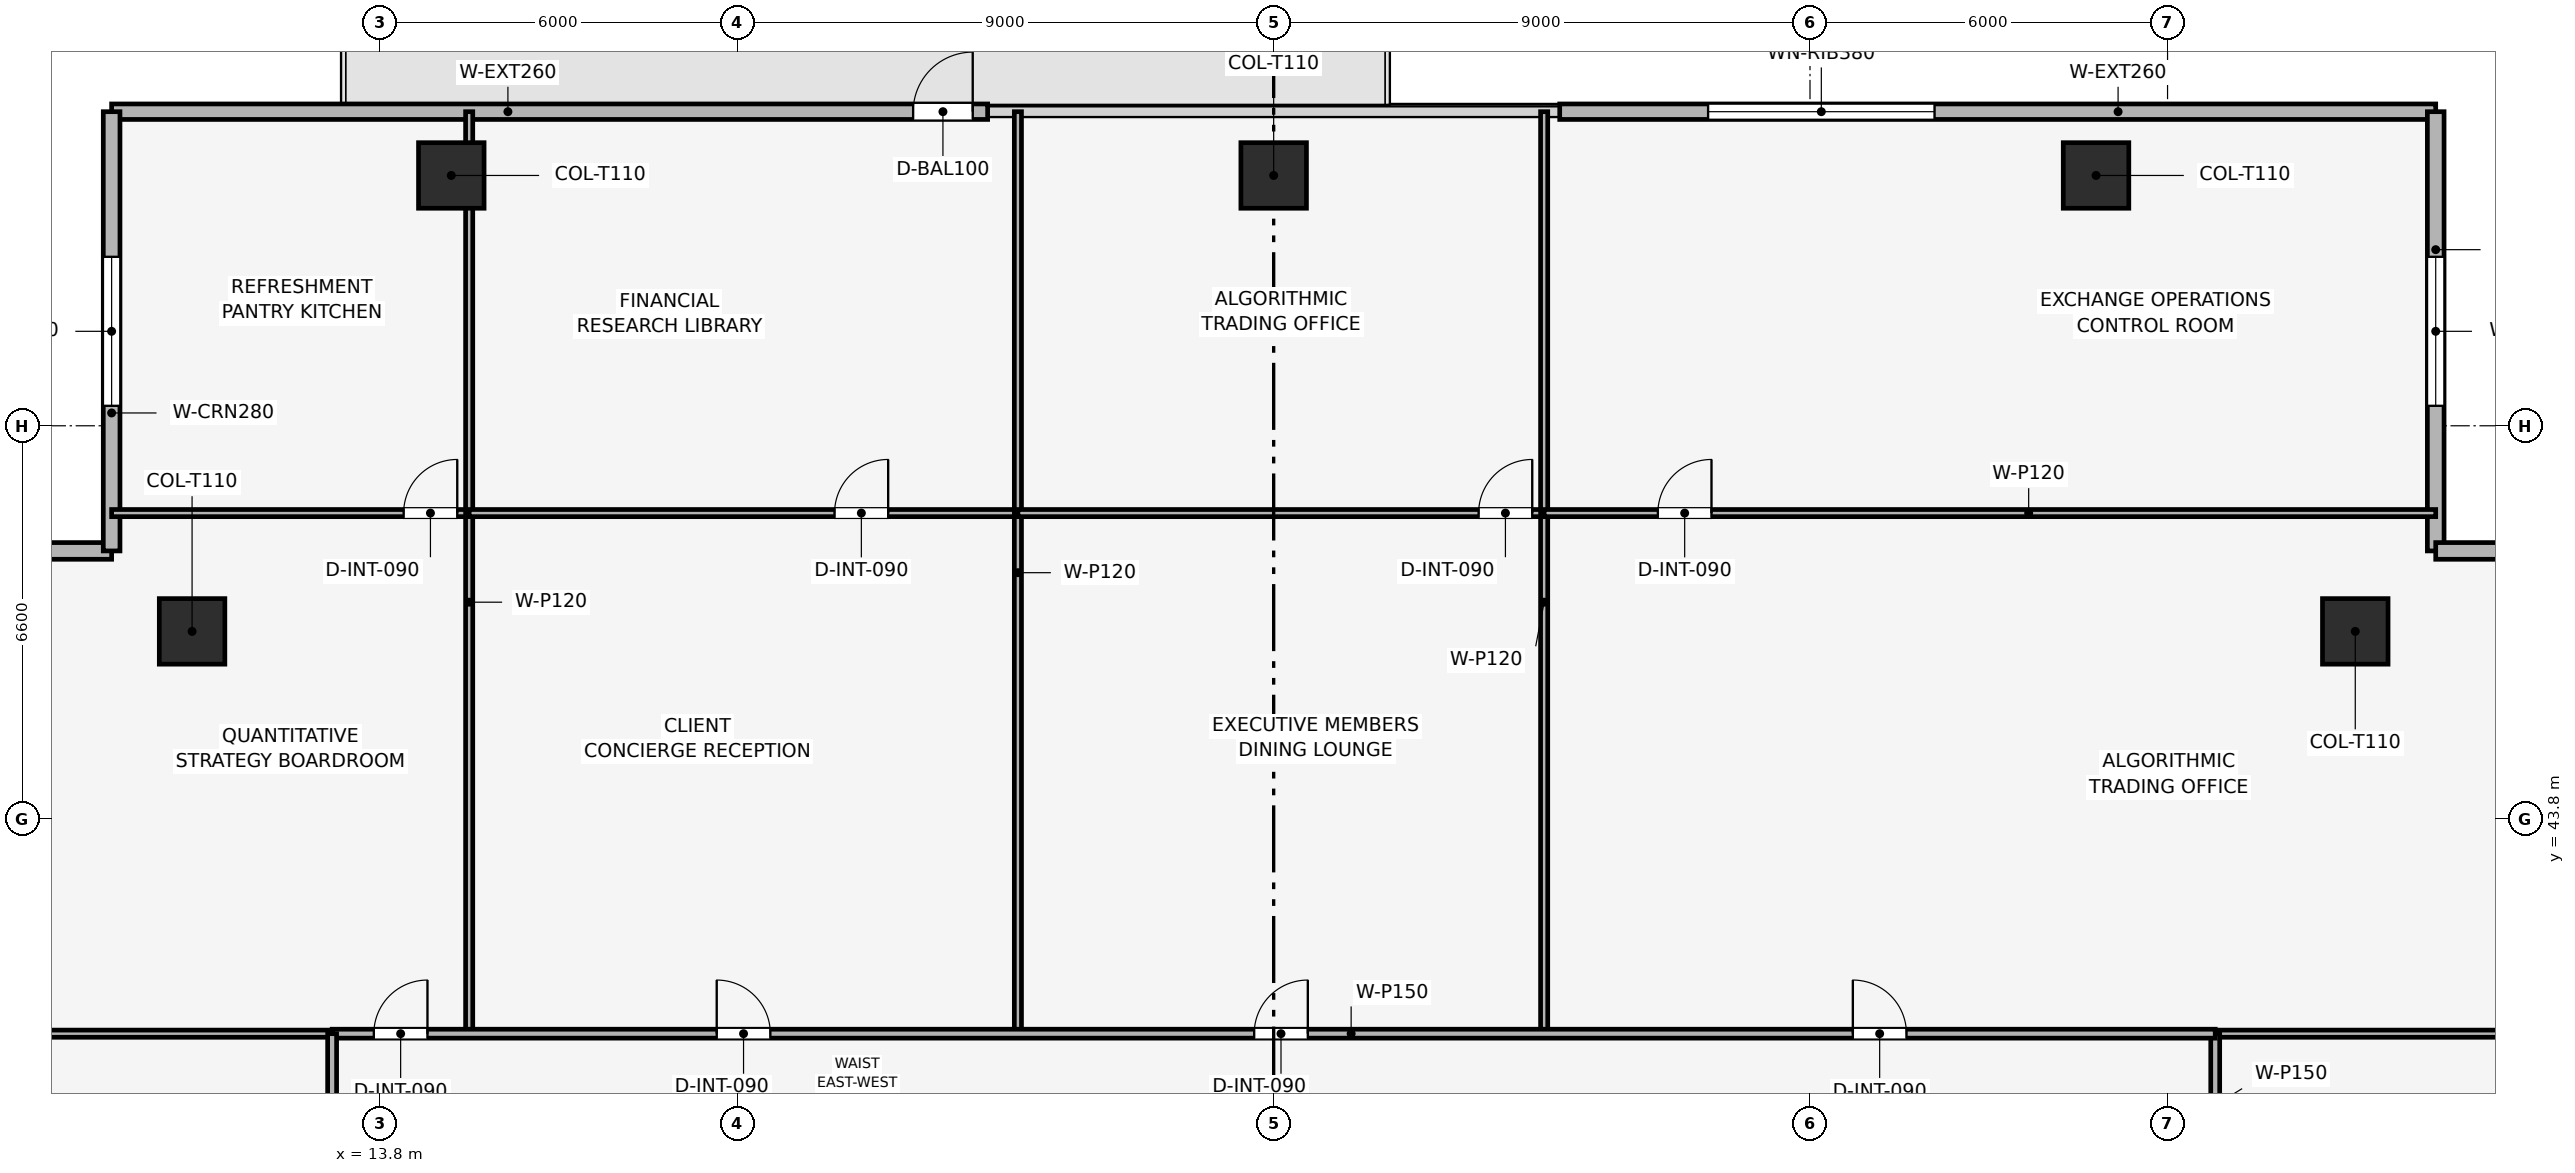
"""IFC4 building model, lengths in metres.
Left out: names, types, materials, properties, quantities, classifications, styles, units other than length and angle.
Written with IfcOpenShell. Run it as: python <this file> out.ifc"""

import sys

from ifc_helpers import new_model, si_unit, direction, frame, frame_2d, origin, origin_2d, place, context, subcontext, project, spatial, rectangle, extrude, element, fill, save


model = new_model("IFC4")
c1 = context("Model", 3, precision=1e-05, world=origin(), true_north=direction((0.0, 1.0)))
c2 = subcontext(c1, "Body", "Model", "MODEL_VIEW")
j1 = project(units=[si_unit("LENGTHUNIT", "METRE"), si_unit("PLANEANGLEUNIT", "RADIAN")], contexts=[c1])
p1 = place(None, origin())
s1 = spatial("IfcSite", under=j1, at=p1, CompositionType="ELEMENT")
p2 = place(p1, origin())
s2 = spatial("IfcBuilding", under=s1, at=p2, CompositionType="ELEMENT")
p3 = place(p2, frame((0.0, 0.0, 203.7)))
s3 = spatial("IfcBuildingStorey", under=s2, at=p3, CompositionType="ELEMENT", Elevation=203.7)
for number, where, z_axis, x_axis in (
    (1, (42.6, 54.6, 0.003), (0.0, 0.0, 1.0), (1.0, 0.0, 0.0)),
    (2, (28.8, 54.6, 0.003), (0.0, 0.0, 1.0), (1.0, 0.0, 0.0)),
    (3, (15.0, 54.6, 0.003), (0.0, 0.0, 1.0), (1.0, 0.0, 0.0)),
    (4, (46.95, 46.95, 0.003), (0.0, 0.0, 1.0), (1.0, 0.0, 0.0)),
    (5, (10.65, 46.95, 0.003), (0.0, 0.0, 1.0), (1.0, 0.0, 0.0)),
):
    element("IfcColumn", number, at=place(p3, frame(where, z_axis=z_axis, x_axis=x_axis)), inside=s3, PredefinedType="COLUMN", context=c2, shape_type="SweptSolid", body=[
        extrude(rectangle(XDim=1.1, YDim=1.1, at=origin_2d()), origin(), (0.0, 0.0, 1.0), 3.494),
    ])
p4 = place(p3, frame((9.3, 55.67, 0.0), z_axis=(0.0, 0.0, 1.0), x_axis=(1.0, 0.0, 0.0)))
e6 = element("IfcWall", 6, at=p4, inside=s3, PredefinedType="SOLIDWALL", context=c2, shape_type="SweptSolid", body=[
    extrude(rectangle(XDim=14.7, YDim=0.26, at=frame_2d((7.35, 0.0))), origin(), (0.0, 0.0, 1.0), 3.5),
])
p5 = place(p4, frame((13.45, 0.0, 0.0)))
e7 = element("IfcOpeningElement", 7, at=p5, cuts=e6, PredefinedType="OPENING", context=c2, shape_type="SweptSolid", body=[
    extrude(rectangle(XDim=1.0, YDim=2.2, at=frame_2d((0.5, 1.1))), frame((0.0, 0.14, 0.0), z_axis=(0.0, -1.0, 0.0), x_axis=(1.0, 0.0, 0.0)), (0.0, 0.0, 1.0), 0.28),
])
p6 = place(p3, frame((33.6, 55.67, 0.0), z_axis=(0.0, 0.0, 1.0), x_axis=(1.0, 0.0, 0.0)))
e8 = element("IfcWall", 8, at=p6, inside=s3, PredefinedType="SOLIDWALL", context=c2, shape_type="SweptSolid", body=[
    extrude(rectangle(XDim=14.7, YDim=0.26, at=frame_2d((7.35, 0.0))), origin(), (0.0, 0.0, 1.0), 3.5),
])
p7 = place(p6, frame((2.49, 0.0, 0.9)))
e9 = element("IfcOpeningElement", 9, at=p7, cuts=e8, PredefinedType="OPENING", context=c2, shape_type="SweptSolid", body=[
    extrude(rectangle(XDim=3.8, YDim=1.9, at=frame_2d((1.9, 0.95))), frame((0.0, 0.14, 0.0), z_axis=(0.0, -1.0, 0.0), x_axis=(1.0, 0.0, 0.0)), (0.0, 0.0, 1.0), 0.28),
])
p8 = place(p3, frame((1.93, 48.3, 0.0), z_axis=(0.0, 0.0, 1.0), x_axis=(1.0, 0.0, 0.0)))
e10 = element("IfcWall", 10, at=p8, inside=s3, PredefinedType="SOLIDWALL", context=c2, shape_type="SweptSolid", body=[
    extrude(rectangle(XDim=7.37, YDim=0.28, at=frame_2d((3.685, 0.0))), origin(), (0.0, 0.0, 1.0), 3.5),
])
p9 = place(p8, frame((2.435, 0.0, 0.9)))
e11 = element("IfcOpeningElement", 11, at=p9, cuts=e10, PredefinedType="OPENING", context=c2, shape_type="SweptSolid", body=[
    extrude(rectangle(XDim=2.5, YDim=1.9, at=frame_2d((1.25, 0.95))), frame((0.0, 0.15, 0.0), z_axis=(0.0, -1.0, 0.0), x_axis=(1.0, 0.0, 0.0)), (0.0, 0.0, 1.0), 0.3),
])
p10 = place(p3, frame((9.3, 48.3, 0.0), z_axis=(0.0, 0.0, 1.0), x_axis=(0.0, 1.0, 0.0)))
e12 = element("IfcWall", 12, at=p10, inside=s3, PredefinedType="SOLIDWALL", context=c2, shape_type="SweptSolid", body=[
    extrude(rectangle(XDim=7.37, YDim=0.28, at=frame_2d((3.685, 0.0))), origin(), (0.0, 0.0, 1.0), 3.5),
])
p11 = place(p10, frame((2.435, 0.0, 0.9)))
e13 = element("IfcOpeningElement", 13, at=p11, cuts=e12, PredefinedType="OPENING", context=c2, shape_type="SweptSolid", body=[
    extrude(rectangle(XDim=2.5, YDim=1.9, at=frame_2d((1.25, 0.95))), frame((0.0, 0.15, 0.0), z_axis=(0.0, -1.0, 0.0), x_axis=(1.0, 0.0, 0.0)), (0.0, 0.0, 1.0), 0.3),
])
p12 = place(p3, frame((48.3, 55.67, 0.0), z_axis=(0.0, 0.0, 1.0), x_axis=(0.0, -1.0, 0.0)))
e14 = element("IfcWall", 14, at=p12, inside=s3, PredefinedType="SOLIDWALL", context=c2, shape_type="SweptSolid", body=[
    extrude(rectangle(XDim=7.37, YDim=0.28, at=frame_2d((3.685, 0.0))), origin(), (0.0, 0.0, 1.0), 3.5),
])
p13 = place(p12, frame((2.435, 0.0, 0.9)))
e15 = element("IfcOpeningElement", 15, at=p13, cuts=e14, PredefinedType="OPENING", context=c2, shape_type="SweptSolid", body=[
    extrude(rectangle(XDim=2.5, YDim=1.9, at=frame_2d((1.25, 0.95))), frame((0.0, 0.15, 0.0), z_axis=(0.0, -1.0, 0.0), x_axis=(1.0, 0.0, 0.0)), (0.0, 0.0, 1.0), 0.3),
])
p14 = place(p3, frame((48.3, 48.3, 0.0), z_axis=(0.0, 0.0, 1.0), x_axis=(1.0, 0.0, 0.0)))
e16 = element("IfcWall", 16, at=p14, inside=s3, PredefinedType="SOLIDWALL", context=c2, shape_type="SweptSolid", body=[
    extrude(rectangle(XDim=7.37, YDim=0.28, at=frame_2d((3.685, 0.0))), origin(), (0.0, 0.0, 1.0), 3.5),
])
p15 = place(p14, frame((2.435, 0.0, 0.9)))
e17 = element("IfcOpeningElement", 17, at=p15, cuts=e16, PredefinedType="OPENING", context=c2, shape_type="SweptSolid", body=[
    extrude(rectangle(XDim=2.5, YDim=1.9, at=frame_2d((1.25, 0.95))), frame((0.0, 0.15, 0.0), z_axis=(0.0, -1.0, 0.0), x_axis=(1.0, 0.0, 0.0)), (0.0, 0.0, 1.0), 0.3),
])
p16 = place(p3, frame((9.3, 48.935, 0.0), z_axis=(0.0, 0.0, 1.0), x_axis=(1.0, 0.0, 0.0)))
e18 = element("IfcWall", 18, at=p16, inside=s3, PredefinedType="PARTITIONING", context=c2, shape_type="SweptSolid", body=[
    extrude(rectangle(XDim=6.0, YDim=0.12, at=frame_2d((3.0, 0.0))), origin(), (0.0, 0.0, 1.0), 2.885),
])
p17 = place(p16, frame((4.9, 0.0, 0.0)))
e19 = element("IfcOpeningElement", 19, at=p17, cuts=e18, PredefinedType="OPENING", context=c2, shape_type="SweptSolid", body=[
    extrude(rectangle(XDim=0.9, YDim=2.1, at=frame_2d((0.45, 1.05))), frame((0.0, 0.07, 0.0), z_axis=(0.0, -1.0, 0.0), x_axis=(1.0, 0.0, 0.0)), (0.0, 0.0, 1.0), 0.14),
])
p18 = place(p3, frame((15.3, 40.2, 0.0), z_axis=(0.0, 0.0, 1.0), x_axis=(0.0, 1.0, 0.0)))
e20 = element("IfcWall", 20, at=p18, inside=s3, PredefinedType="PARTITIONING", context=c2, shape_type="SweptSolid", body=[
    extrude(rectangle(XDim=15.47, YDim=0.12, at=frame_2d((7.735, 0.0))), origin(), (0.0, 0.0, 1.0), 2.885),
])
p19 = place(p3, frame((15.3, 48.935, 0.0), z_axis=(0.0, 0.0, 1.0), x_axis=(1.0, 0.0, 0.0)))
e21 = element("IfcWall", 21, at=p19, inside=s3, PredefinedType="PARTITIONING", context=c2, shape_type="SweptSolid", body=[
    extrude(rectangle(XDim=9.208, YDim=0.12, at=frame_2d((4.604, 0.0))), origin(), (0.0, 0.0, 1.0), 3.035),
])
p20 = place(p19, frame((6.131, 0.0, 0.0)))
e22 = element("IfcOpeningElement", 22, at=p20, cuts=e21, PredefinedType="OPENING", context=c2, shape_type="SweptSolid", body=[
    extrude(rectangle(XDim=0.9, YDim=2.1, at=frame_2d((0.45, 1.05))), frame((0.0, 0.07, 0.0), z_axis=(0.0, -1.0, 0.0), x_axis=(1.0, 0.0, 0.0)), (0.0, 0.0, 1.0), 0.14),
])
p21 = place(p3, frame((24.508, 40.2, 0.0), z_axis=(0.0, 0.0, 1.0), x_axis=(0.0, 1.0, 0.0)))
e23 = element("IfcWall", 23, at=p21, inside=s3, PredefinedType="PARTITIONING", context=c2, shape_type="SweptSolid", body=[
    extrude(rectangle(XDim=15.47, YDim=0.12, at=frame_2d((7.735, 0.0))), origin(), (0.0, 0.0, 1.0), 2.885),
])
p22 = place(p3, frame((24.508, 48.935, 0.0), z_axis=(0.0, 0.0, 1.0), x_axis=(1.0, 0.0, 0.0)))
e24 = element("IfcWall", 24, at=p22, inside=s3, PredefinedType="PARTITIONING", context=c2, shape_type="SweptSolid", body=[
    extrude(rectangle(XDim=8.831, YDim=0.12, at=frame_2d((4.416, 0.0))), origin(), (0.0, 0.0, 1.0), 3.035),
])
p23 = place(p22, frame((7.731, 0.0, 0.0)))
e25 = element("IfcOpeningElement", 25, at=p23, cuts=e24, PredefinedType="OPENING", context=c2, shape_type="SweptSolid", body=[
    extrude(rectangle(XDim=0.9, YDim=2.1, at=frame_2d((0.45, 1.05))), frame((0.0, 0.07, 0.0), z_axis=(0.0, -1.0, 0.0), x_axis=(1.0, 0.0, 0.0)), (0.0, 0.0, 1.0), 0.14),
])
p24 = place(p3, frame((33.339, 40.2, 0.0), z_axis=(0.0, 0.0, 1.0), x_axis=(0.0, 1.0, 0.0)))
e26 = element("IfcWall", 26, at=p24, inside=s3, PredefinedType="PARTITIONING", context=c2, shape_type="SweptSolid", body=[
    extrude(rectangle(XDim=15.47, YDim=0.12, at=frame_2d((7.735, 0.0))), origin(), (0.0, 0.0, 1.0), 2.885),
])
p25 = place(p3, frame((33.339, 48.935, 0.0), z_axis=(0.0, 0.0, 1.0), x_axis=(1.0, 0.0, 0.0)))
e27 = element("IfcWall", 27, at=p25, inside=s3, PredefinedType="PARTITIONING", context=c2, shape_type="SweptSolid", body=[
    extrude(rectangle(XDim=14.961, YDim=0.12, at=frame_2d((7.48, 0.0))), origin(), (0.0, 0.0, 1.0), 2.885),
])
p26 = place(p25, frame((1.908, 0.0, 0.0)))
e28 = element("IfcOpeningElement", 28, at=p26, cuts=e27, PredefinedType="OPENING", context=c2, shape_type="SweptSolid", body=[
    extrude(rectangle(XDim=0.9, YDim=2.1, at=frame_2d((0.45, 1.05))), frame((0.0, 0.07, 0.0), z_axis=(0.0, -1.0, 0.0), x_axis=(1.0, 0.0, 0.0)), (0.0, 0.0, 1.0), 0.14),
])
p27 = place(p3, frame((1.93, 40.2, 0.0), z_axis=(0.0, 0.0, 1.0), x_axis=(1.0, 0.0, 0.0)))
e29 = element("IfcWall", 29, at=p27, inside=s3, PredefinedType="PARTITIONING", context=c2, shape_type="SweptSolid", body=[
    extrude(rectangle(XDim=11.07, YDim=0.12, at=frame_2d((5.535, 0.0))), origin(), (0.0, 0.0, 1.0), 2.885),
])
p28 = place(p3, frame((44.6, 40.2, 0.0), z_axis=(0.0, 0.0, 1.0), x_axis=(1.0, 0.0, 0.0)))
e30 = element("IfcWall", 30, at=p28, inside=s3, PredefinedType="PARTITIONING", context=c2, shape_type="SweptSolid", body=[
    extrude(rectangle(XDim=11.07, YDim=0.12, at=frame_2d((5.535, 0.0))), origin(), (0.0, 0.0, 1.0), 2.885),
])
p29 = place(p3, frame((44.6, 37.8, 0.0), z_axis=(0.0, 0.0, 1.0), x_axis=(0.0, 1.0, 0.0)))
e31 = element("IfcWall", 31, at=p29, inside=s3, PredefinedType="PARTITIONING", context=c2, shape_type="SweptSolid", body=[
    extrude(rectangle(XDim=2.4, YDim=0.15, at=frame_2d((1.2, 0.0))), origin(), (0.0, 0.0, 1.0), 3.5),
])
p30 = place(p3, frame((13.0, 40.2, 0.0), z_axis=(0.0, 0.0, 1.0), x_axis=(1.0, 0.0, 0.0)))
e32 = element("IfcWall", 32, at=p30, inside=s3, PredefinedType="PARTITIONING", context=c2, shape_type="SweptSolid", body=[
    extrude(rectangle(XDim=31.6, YDim=0.15, at=frame_2d((15.8, 0.0))), origin(), (0.0, 0.0, 1.0), 3.035),
])
p31 = place(p30, frame((0.7, 0.0, 0.0)))
e33 = element("IfcOpeningElement", 33, at=p31, cuts=e32, PredefinedType="OPENING", context=c2, shape_type="SweptSolid", body=[
    extrude(rectangle(XDim=0.9, YDim=2.1, at=frame_2d((0.45, 1.05))), frame((0.0, 0.085, 0.0), z_axis=(0.0, -1.0, 0.0), x_axis=(1.0, 0.0, 0.0)), (0.0, 0.0, 1.0), 0.17),
])
p32 = place(p30, frame((6.454, 0.0, 0.0)))
e34 = element("IfcOpeningElement", 34, at=p32, cuts=e32, PredefinedType="OPENING", context=c2, shape_type="SweptSolid", body=[
    extrude(rectangle(XDim=0.9, YDim=2.1, at=frame_2d((0.45, 1.05))), frame((0.0, 0.085, 0.0), z_axis=(0.0, -1.0, 0.0), x_axis=(1.0, 0.0, 0.0)), (0.0, 0.0, 1.0), 0.17),
])
p33 = place(p30, frame((15.473, 0.0, 0.0)))
e35 = element("IfcOpeningElement", 35, at=p33, cuts=e32, PredefinedType="OPENING", context=c2, shape_type="SweptSolid", body=[
    extrude(rectangle(XDim=0.9, YDim=2.1, at=frame_2d((0.45, 1.05))), frame((0.0, 0.085, 0.0), z_axis=(0.0, -1.0, 0.0), x_axis=(1.0, 0.0, 0.0)), (0.0, 0.0, 1.0), 0.17),
])
p34 = place(p30, frame((25.519, 0.0, 0.0)))
e36 = element("IfcOpeningElement", 36, at=p34, cuts=e32, PredefinedType="OPENING", context=c2, shape_type="SweptSolid", body=[
    extrude(rectangle(XDim=0.9, YDim=2.1, at=frame_2d((0.45, 1.05))), frame((0.0, 0.085, 0.0), z_axis=(0.0, -1.0, 0.0), x_axis=(1.0, 0.0, 0.0)), (0.0, 0.0, 1.0), 0.17),
])
p35 = place(p3, frame((13.0, 17.4, 0.0), z_axis=(0.0, 0.0, 1.0), x_axis=(0.0, 1.0, 0.0)))
e37 = element("IfcWall", 37, at=p35, inside=s3, PredefinedType="PARTITIONING", context=c2, shape_type="SweptSolid", body=[
    extrude(rectangle(XDim=22.8, YDim=0.15, at=frame_2d((11.4, 0.0))), origin(), (0.0, 0.0, 1.0), 3.035),
])
p36 = place(p35, frame((4.641, 0.0, 0.0)))
e38 = element("IfcOpeningElement", 38, at=p36, cuts=e37, PredefinedType="OPENING", context=c2, shape_type="SweptSolid", body=[
    extrude(rectangle(XDim=0.9, YDim=2.1, at=frame_2d((0.45, 1.05))), frame((0.0, 0.085, 0.0), z_axis=(0.0, -1.0, 0.0), x_axis=(1.0, 0.0, 0.0)), (0.0, 0.0, 1.0), 0.17),
])
p37 = place(p35, frame((13.641, 0.0, 0.0)))
e39 = element("IfcOpeningElement", 39, at=p37, cuts=e37, PredefinedType="OPENING", context=c2, shape_type="SweptSolid", body=[
    extrude(rectangle(XDim=0.9, YDim=2.1, at=frame_2d((0.45, 1.05))), frame((0.0, 0.085, 0.0), z_axis=(0.0, -1.0, 0.0), x_axis=(1.0, 0.0, 0.0)), (0.0, 0.0, 1.0), 0.17),
])
p38 = place(p5, origin())
e40 = element("IfcDoor", 40, at=p38, inside=s3, OperationType="SINGLE_SWING_RIGHT", PredefinedType="DOOR", context=c2, shape_type="SweptSolid", body=[
    extrude(rectangle(XDim=1.0, YDim=2.2, at=frame_2d((0.5, 1.1))), frame((0.0, 0.025, 0.0), z_axis=(0.0, -1.0, 0.0), x_axis=(1.0, 0.0, 0.0)), (0.0, 0.0, 1.0), 0.05),
])
fill(e7, e40)
p39 = place(p7, origin())
e41 = element("IfcWindow", 41, at=p39, inside=s3, PartitioningType="SINGLE_PANEL", PredefinedType="WINDOW", context=c2, shape_type="SweptSolid", body=[
    extrude(rectangle(XDim=3.8, YDim=1.9, at=frame_2d((1.9, 0.95))), frame((0.0, 0.03, 0.0), z_axis=(0.0, -1.0, 0.0), x_axis=(1.0, 0.0, 0.0)), (0.0, 0.0, 1.0), 0.06),
])
fill(e9, e41)
p40 = place(p11, origin())
e42 = element("IfcWindow", 42, at=p40, inside=s3, PartitioningType="SINGLE_PANEL", PredefinedType="WINDOW", context=c2, shape_type="SweptSolid", body=[
    extrude(rectangle(XDim=2.5, YDim=1.9, at=frame_2d((1.25, 0.95))), frame((0.0, 0.03, 0.0), z_axis=(0.0, -1.0, 0.0), x_axis=(1.0, 0.0, 0.0)), (0.0, 0.0, 1.0), 0.06),
])
fill(e13, e42)
p41 = place(p13, origin())
e43 = element("IfcWindow", 43, at=p41, inside=s3, PartitioningType="SINGLE_PANEL", PredefinedType="WINDOW", context=c2, shape_type="SweptSolid", body=[
    extrude(rectangle(XDim=2.5, YDim=1.9, at=frame_2d((1.25, 0.95))), frame((0.0, 0.03, 0.0), z_axis=(0.0, -1.0, 0.0), x_axis=(1.0, 0.0, 0.0)), (0.0, 0.0, 1.0), 0.06),
])
fill(e15, e43)
p42 = place(p17, origin())
e44 = element("IfcDoor", 44, at=p42, inside=s3, OperationType="SINGLE_SWING_RIGHT", PredefinedType="DOOR", context=c2, shape_type="SweptSolid", body=[
    extrude(rectangle(XDim=0.9, YDim=2.1, at=frame_2d((0.45, 1.05))), frame((0.0, 0.025, 0.0), z_axis=(0.0, -1.0, 0.0), x_axis=(1.0, 0.0, 0.0)), (0.0, 0.0, 1.0), 0.05),
])
fill(e19, e44)
p43 = place(p20, origin())
e45 = element("IfcDoor", 45, at=p43, inside=s3, OperationType="SINGLE_SWING_RIGHT", PredefinedType="DOOR", context=c2, shape_type="SweptSolid", body=[
    extrude(rectangle(XDim=0.9, YDim=2.1, at=frame_2d((0.45, 1.05))), frame((0.0, 0.025, 0.0), z_axis=(0.0, -1.0, 0.0), x_axis=(1.0, 0.0, 0.0)), (0.0, 0.0, 1.0), 0.05),
])
fill(e22, e45)
p44 = place(p23, origin())
e46 = element("IfcDoor", 46, at=p44, inside=s3, OperationType="SINGLE_SWING_RIGHT", PredefinedType="DOOR", context=c2, shape_type="SweptSolid", body=[
    extrude(rectangle(XDim=0.9, YDim=2.1, at=frame_2d((0.45, 1.05))), frame((0.0, 0.025, 0.0), z_axis=(0.0, -1.0, 0.0), x_axis=(1.0, 0.0, 0.0)), (0.0, 0.0, 1.0), 0.05),
])
fill(e25, e46)
p45 = place(p26, origin())
e47 = element("IfcDoor", 47, at=p45, inside=s3, OperationType="SINGLE_SWING_RIGHT", PredefinedType="DOOR", context=c2, shape_type="SweptSolid", body=[
    extrude(rectangle(XDim=0.9, YDim=2.1, at=frame_2d((0.45, 1.05))), frame((0.0, 0.025, 0.0), z_axis=(0.0, -1.0, 0.0), x_axis=(1.0, 0.0, 0.0)), (0.0, 0.0, 1.0), 0.05),
])
fill(e28, e47)
p46 = place(p31, origin())
e48 = element("IfcDoor", 48, at=p46, inside=s3, OperationType="SINGLE_SWING_RIGHT", PredefinedType="DOOR", context=c2, shape_type="SweptSolid", body=[
    extrude(rectangle(XDim=0.9, YDim=2.1, at=frame_2d((0.45, 1.05))), frame((0.0, 0.025, 0.0), z_axis=(0.0, -1.0, 0.0), x_axis=(1.0, 0.0, 0.0)), (0.0, 0.0, 1.0), 0.05),
])
fill(e33, e48)
p47 = place(p32, origin())
e49 = element("IfcDoor", 49, at=p47, inside=s3, OperationType="SINGLE_SWING_LEFT", PredefinedType="DOOR", context=c2, shape_type="SweptSolid", body=[
    extrude(rectangle(XDim=0.9, YDim=2.1, at=frame_2d((0.45, 1.05))), frame((0.0, 0.025, 0.0), z_axis=(0.0, -1.0, 0.0), x_axis=(1.0, 0.0, 0.0)), (0.0, 0.0, 1.0), 0.05),
])
fill(e34, e49)
p48 = place(p33, origin())
e50 = element("IfcDoor", 50, at=p48, inside=s3, OperationType="SINGLE_SWING_RIGHT", PredefinedType="DOOR", context=c2, shape_type="SweptSolid", body=[
    extrude(rectangle(XDim=0.9, YDim=2.1, at=frame_2d((0.45, 1.05))), frame((0.0, 0.025, 0.0), z_axis=(0.0, -1.0, 0.0), x_axis=(1.0, 0.0, 0.0)), (0.0, 0.0, 1.0), 0.05),
])
fill(e35, e50)
p49 = place(p34, origin())
e51 = element("IfcDoor", 51, at=p49, inside=s3, OperationType="SINGLE_SWING_LEFT", PredefinedType="DOOR", context=c2, shape_type="SweptSolid", body=[
    extrude(rectangle(XDim=0.9, YDim=2.1, at=frame_2d((0.45, 1.05))), frame((0.0, 0.025, 0.0), z_axis=(0.0, -1.0, 0.0), x_axis=(1.0, 0.0, 0.0)), (0.0, 0.0, 1.0), 0.05),
])
fill(e36, e51)
save(model, sys.argv[1])
